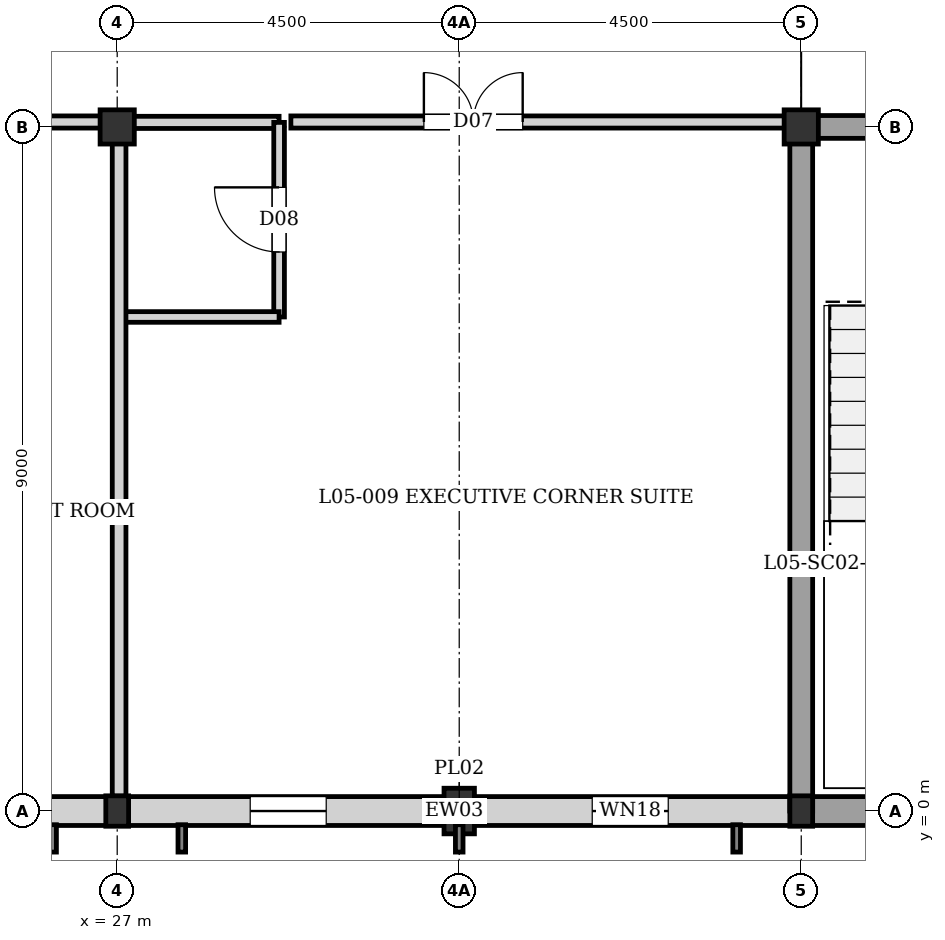
"""IFC4 building model, lengths in metres.
Left out: names, types, materials, properties, quantities, classifications, styles, units other than length and angle.
Written with IfcOpenShell. Run it as: python <this file> out.ifc"""

import sys

from ifc_helpers import new_model, si_unit, direction, frame, frame_2d, origin, origin_2d, place, context, subcontext, project, spatial, rectangle, i_section, extrude, element, fill, save


model = new_model("IFC4")
c1 = context("Model", 3, precision=1e-05, world=origin(), true_north=direction((0.0, 1.0)))
c2 = subcontext(c1, "Body", "Model", "MODEL_VIEW")
j1 = project(units=[si_unit("LENGTHUNIT", "METRE"), si_unit("PLANEANGLEUNIT", "RADIAN")], contexts=[c1])
p1 = place(None, origin())
s1 = spatial("IfcSite", under=j1, at=p1, CompositionType="ELEMENT")
p2 = place(p1, origin())
s2 = spatial("IfcBuilding", under=s1, at=p2, CompositionType="ELEMENT")
p3 = place(p2, frame((0.0, 0.0, 17.6)))
s3 = spatial("IfcBuildingStorey", under=s2, at=p3, CompositionType="ELEMENT", Elevation=17.6)
p4 = place(p3, frame((27.0, 0.0, 0.0), z_axis=(0.0, 0.0, 1.0), x_axis=(1.0, 0.0, 0.0)))
e1 = element("IfcColumn", 1, at=p4, inside=s3, PredefinedType="COLUMN", context=c2, shape_type="SweptSolid", body=[
    extrude(i_section(OverallWidth=0.3, OverallDepth=0.4, WebThickness=0.013, FlangeThickness=0.024, at=origin_2d()), origin(), (0.0, 0.0, 1.0), 3.04),
])
p5 = place(p3, frame((27.0, 9.0, 0.0), z_axis=(0.0, 0.0, 1.0), x_axis=(1.0, 0.0, 0.0)))
e2 = element("IfcColumn", 2, at=p5, inside=s3, PredefinedType="COLUMN", context=c2, shape_type="SweptSolid", body=[
    extrude(rectangle(XDim=0.45, YDim=0.45, at=origin_2d()), origin(), (0.0, 0.0, 1.0), 3.04),
])
p6 = place(p3, frame((36.0, 0.0, 0.0), z_axis=(0.0, 0.0, 1.0), x_axis=(1.0, 0.0, 0.0)))
e3 = element("IfcColumn", 3, at=p6, inside=s3, PredefinedType="COLUMN", context=c2, shape_type="SweptSolid", body=[
    extrude(i_section(OverallWidth=0.3, OverallDepth=0.4, WebThickness=0.013, FlangeThickness=0.024, at=origin_2d()), origin(), (0.0, 0.0, 1.0), 3.04),
])
p7 = place(p3, frame((36.0, 9.0, 0.0), z_axis=(0.0, 0.0, 1.0), x_axis=(1.0, 0.0, 0.0)))
e4 = element("IfcColumn", 4, at=p7, inside=s3, PredefinedType="COLUMN", context=c2, shape_type="SweptSolid", body=[
    extrude(rectangle(XDim=0.45, YDim=0.45, at=origin_2d()), origin(), (0.0, 0.0, 1.0), 3.04),
])
p8 = place(p3, frame((31.5, 0.0, 0.0), z_axis=(0.0, 0.0, 1.0), x_axis=(1.0, 0.0, 0.0)))
e5 = element("IfcColumn", 5, at=p8, inside=s3, PredefinedType="PILASTER", context=c2, shape_type="SweptSolid", body=[
    extrude(rectangle(XDim=0.4, YDim=0.6, at=origin_2d()), origin(), (0.0, 0.0, 1.0), 3.04),
])
p9 = place(p3, frame((45.0, 0.0, 0.0), z_axis=(0.0, 0.0, 1.0), x_axis=(-1.0, 0.0, 0.0)))
e6 = element("IfcWall", 6, at=p9, inside=s3, PredefinedType="SOLIDWALL", context=c2, shape_type="SweptSolid", body=[
    extrude(rectangle(XDim=9.0, YDim=0.38, at=frame_2d((4.5, 0.0))), origin(), (0.0, 0.0, 1.0), 2.82),
])
p10 = place(p3, frame((35.87, 0.0, 0.0), z_axis=(0.0, 0.0, 1.0), x_axis=(-1.0, 0.0, 0.0)))
e7 = element("IfcWall", 7, at=p10, inside=s3, PredefinedType="SOLIDWALL", context=c2, shape_type="SweptSolid", body=[
    extrude(rectangle(XDim=8.87, YDim=0.38, at=frame_2d((4.435, 0.0))), origin(), (0.0, 0.0, 1.0), 2.42),
])
p11 = place(p10, frame((1.62, 0.0, 0.35)))
e8 = element("IfcOpeningElement", 8, at=p11, cuts=e7, PredefinedType="OPENING", context=c2, shape_type="SweptSolid", body=[
    extrude(rectangle(XDim=1.0, YDim=1.6, at=frame_2d((0.5, 0.8))), frame((0.0, 0.2, 0.0), z_axis=(0.0, -1.0, 0.0), x_axis=(1.0, 0.0, 0.0)), (0.0, 0.0, 1.0), 0.4),
])
p12 = place(p10, frame((6.12, 0.0, 0.35)))
e9 = element("IfcOpeningElement", 9, at=p12, cuts=e7, PredefinedType="OPENING", context=c2, shape_type="SweptSolid", body=[
    extrude(rectangle(XDim=1.0, YDim=1.6, at=frame_2d((0.5, 0.8))), frame((0.0, 0.2, 0.0), z_axis=(0.0, -1.0, 0.0), x_axis=(1.0, 0.0, 0.0)), (0.0, 0.0, 1.0), 0.4),
])
p13 = place(p3, frame((27.0, 0.0, 0.0), z_axis=(0.0, 0.0, 1.0), x_axis=(-1.0, 0.0, 0.0)))
e10 = element("IfcWall", 10, at=p13, inside=s3, PredefinedType="SOLIDWALL", context=c2, shape_type="SweptSolid", body=[
    extrude(rectangle(XDim=8.87, YDim=0.38, at=frame_2d((4.435, 0.0))), origin(), (0.0, 0.0, 1.0), 2.48),
])
p14 = place(p13, frame((1.75, 0.0, 0.35)))
e11 = element("IfcOpeningElement", 11, at=p14, cuts=e10, PredefinedType="OPENING", context=c2, shape_type="SweptSolid", body=[
    extrude(rectangle(XDim=1.0, YDim=1.6, at=frame_2d((0.5, 0.8))), frame((0.0, 0.2, 0.0), z_axis=(0.0, -1.0, 0.0), x_axis=(1.0, 0.0, 0.0)), (0.0, 0.0, 1.0), 0.4),
])
p15 = place(p13, frame((6.25, 0.0, 0.35)))
e12 = element("IfcOpeningElement", 12, at=p15, cuts=e10, PredefinedType="OPENING", context=c2, shape_type="SweptSolid", body=[
    extrude(rectangle(XDim=1.0, YDim=1.6, at=frame_2d((0.5, 0.8))), frame((0.0, 0.2, 0.0), z_axis=(0.0, -1.0, 0.0), x_axis=(1.0, 0.0, 0.0)), (0.0, 0.0, 1.0), 0.4),
])
p16 = place(p3, frame((36.0, 9.0, 0.0), z_axis=(0.0, 0.0, 1.0), x_axis=(1.0, 0.0, 0.0)))
e13 = element("IfcWall", 13, at=p16, inside=s3, PredefinedType="SHEAR", context=c2, shape_type="SweptSolid", body=[
    extrude(rectangle(XDim=9.0, YDim=0.3, at=frame_2d((4.5, 0.0))), origin(), (0.0, 0.0, 1.0), 2.82),
])
p17 = place(p16, frame((5.95, 0.0, 0.0)))
e14 = element("IfcOpeningElement", 14, at=p17, cuts=e13, PredefinedType="OPENING", context=c2, shape_type="SweptSolid", body=[
    extrude(rectangle(XDim=1.6, YDim=2.1, at=frame_2d((0.8, 1.05))), frame((0.0, 0.16, 0.0), z_axis=(0.0, -1.0, 0.0), x_axis=(1.0, 0.0, 0.0)), (0.0, 0.0, 1.0), 0.32),
])
p18 = place(p3, frame((36.0, 0.0, 0.0), z_axis=(0.0, 0.0, 1.0), x_axis=(0.0, 1.0, 0.0)))
e15 = element("IfcWall", 15, at=p18, inside=s3, PredefinedType="SHEAR", context=c2, shape_type="SweptSolid", body=[
    extrude(rectangle(XDim=9.0, YDim=0.3, at=frame_2d((4.5, 0.0))), origin(), (0.0, 0.0, 1.0), 2.82),
])
p19 = place(p3, frame((27.07, 9.06, 0.0), z_axis=(0.0, 0.0, 1.0), x_axis=(1.0, 0.0, 0.0)))
e16 = element("IfcWall", 16, at=p19, inside=s3, PredefinedType="PARTITIONING", context=c2, shape_type="SweptSolid", body=[
    extrude(rectangle(XDim=2.06, YDim=0.16, at=frame_2d((1.03, 0.0))), origin(), (0.0, 0.0, 1.0), 2.29),
])
p20 = place(p3, frame((29.13, 6.5, 0.0), z_axis=(0.0, 0.0, 1.0), x_axis=(0.0, 1.0, 0.0)))
e17 = element("IfcWall", 17, at=p20, inside=s3, PredefinedType="PLUMBINGWALL", context=c2, shape_type="SweptSolid", body=[
    extrude(rectangle(XDim=2.56, YDim=0.14, at=frame_2d((1.28, 0.0))), origin(), (0.0, 0.0, 1.0), 2.82),
])
p21 = place(p20, frame((0.855, 0.0, 0.0)))
e18 = element("IfcOpeningElement", 18, at=p21, cuts=e17, PredefinedType="OPENING", context=c2, shape_type="SweptSolid", body=[
    extrude(rectangle(XDim=0.85, YDim=2.04, at=frame_2d((0.425, 1.02))), frame((0.0, 0.08, 0.0), z_axis=(0.0, -1.0, 0.0), x_axis=(1.0, 0.0, 0.0)), (0.0, 0.0, 1.0), 0.16),
])
p22 = place(p3, frame((27.07, 6.5, 0.0), z_axis=(0.0, 0.0, 1.0), x_axis=(1.0, 0.0, 0.0)))
e19 = element("IfcWall", 19, at=p22, inside=s3, PredefinedType="PLUMBINGWALL", context=c2, shape_type="SweptSolid", body=[
    extrude(rectangle(XDim=2.06, YDim=0.14, at=frame_2d((1.03, 0.0))), origin(), (0.0, 0.0, 1.0), 2.82),
])
p23 = place(p3, frame((27.025, 0.195, 0.0), z_axis=(0.0, 0.0, 1.0), x_axis=(0.0, 1.0, 0.0)))
e20 = element("IfcWall", 20, at=p23, inside=s3, PredefinedType="PARTITIONING", context=c2, shape_type="SweptSolid", body=[
    extrude(rectangle(XDim=8.71, YDim=0.18, at=frame_2d((4.355, 0.0))), origin(), (0.0, 0.0, 1.0), 2.34),
])
p24 = place(p3, frame((24.735, 9.065, 0.0), z_axis=(0.0, 0.0, 1.0), x_axis=(1.0, 0.0, 0.0)))
e21 = element("IfcWall", 21, at=p24, inside=s3, PredefinedType="PARTITIONING", context=c2, shape_type="SweptSolid", body=[
    extrude(rectangle(XDim=2.135, YDim=0.16, at=frame_2d((1.067, 0.0))), origin(), (0.0, 0.0, 1.0), 2.34),
])
p25 = place(p24, frame((0.336, 0.0, 0.0)))
e22 = element("IfcOpeningElement", 22, at=p25, cuts=e21, PredefinedType="OPENING", context=c2, shape_type="SweptSolid", body=[
    extrude(rectangle(XDim=0.95, YDim=2.15, at=frame_2d((0.475, 1.075))), frame((0.0, 0.09, 0.0), z_axis=(0.0, -1.0, 0.0), x_axis=(1.0, 0.0, 0.0)), (0.0, 0.0, 1.0), 0.18),
])
p26 = place(p3, frame((29.285, 9.065, 0.0), z_axis=(0.0, 0.0, 1.0), x_axis=(1.0, 0.0, 0.0)))
e23 = element("IfcWall", 23, at=p26, inside=s3, PredefinedType="PARTITIONING", context=c2, shape_type="SweptSolid", body=[
    extrude(rectangle(XDim=6.56, YDim=0.16, at=frame_2d((3.28, 0.0))), origin(), (0.0, 0.0, 1.0), 2.29),
])
p27 = place(p26, frame((1.75, 0.0, 0.0)))
e24 = element("IfcOpeningElement", 24, at=p27, cuts=e23, PredefinedType="OPENING", context=c2, shape_type="SweptSolid", body=[
    extrude(rectangle(XDim=1.3, YDim=2.25, at=frame_2d((0.65, 1.125))), frame((0.0, 0.09, 0.0), z_axis=(0.0, -1.0, 0.0), x_axis=(1.0, 0.0, 0.0)), (0.0, 0.0, 1.0), 0.18),
])
p28 = place(p11, origin())
e25 = element("IfcWindow", 25, at=p28, inside=s3, PartitioningType="SINGLE_PANEL", PredefinedType="WINDOW", context=c2, shape_type="SweptSolid", body=[
    extrude(rectangle(XDim=1.0, YDim=1.6, at=frame_2d((0.5, 0.8))), frame((0.0, 0.03, 0.0), z_axis=(0.0, -1.0, 0.0), x_axis=(1.0, 0.0, 0.0)), (0.0, 0.0, 1.0), 0.06),
])
fill(e8, e25)
p29 = place(p12, origin())
e26 = element("IfcWindow", 26, at=p29, inside=s3, PartitioningType="SINGLE_PANEL", PredefinedType="WINDOW", context=c2, shape_type="SweptSolid", body=[
    extrude(rectangle(XDim=1.0, YDim=1.6, at=frame_2d((0.5, 0.8))), frame((0.0, 0.03, 0.0), z_axis=(0.0, -1.0, 0.0), x_axis=(1.0, 0.0, 0.0)), (0.0, 0.0, 1.0), 0.06),
])
fill(e9, e26)
p30 = place(p21, origin())
e27 = element("IfcDoor", 27, at=p30, inside=s3, OperationType="SINGLE_SWING_RIGHT", PredefinedType="DOOR", context=c2, shape_type="SweptSolid", body=[
    extrude(rectangle(XDim=0.85, YDim=2.04, at=frame_2d((0.425, 1.02))), frame((0.0, 0.025, 0.0), z_axis=(0.0, -1.0, 0.0), x_axis=(1.0, 0.0, 0.0)), (0.0, 0.0, 1.0), 0.05),
])
fill(e18, e27)
p31 = place(p27, origin())
e28 = element("IfcDoor", 28, at=p31, inside=s3, OperationType="DOUBLE_DOOR_SINGLE_SWING", PredefinedType="DOOR", context=c2, shape_type="SweptSolid", body=[
    extrude(rectangle(XDim=1.3, YDim=2.25, at=frame_2d((0.65, 1.125))), frame((0.0, 0.025, 0.0), z_axis=(0.0, -1.0, 0.0), x_axis=(1.0, 0.0, 0.0)), (0.0, 0.0, 1.0), 0.05),
])
fill(e24, e28)
save(model, sys.argv[1])
